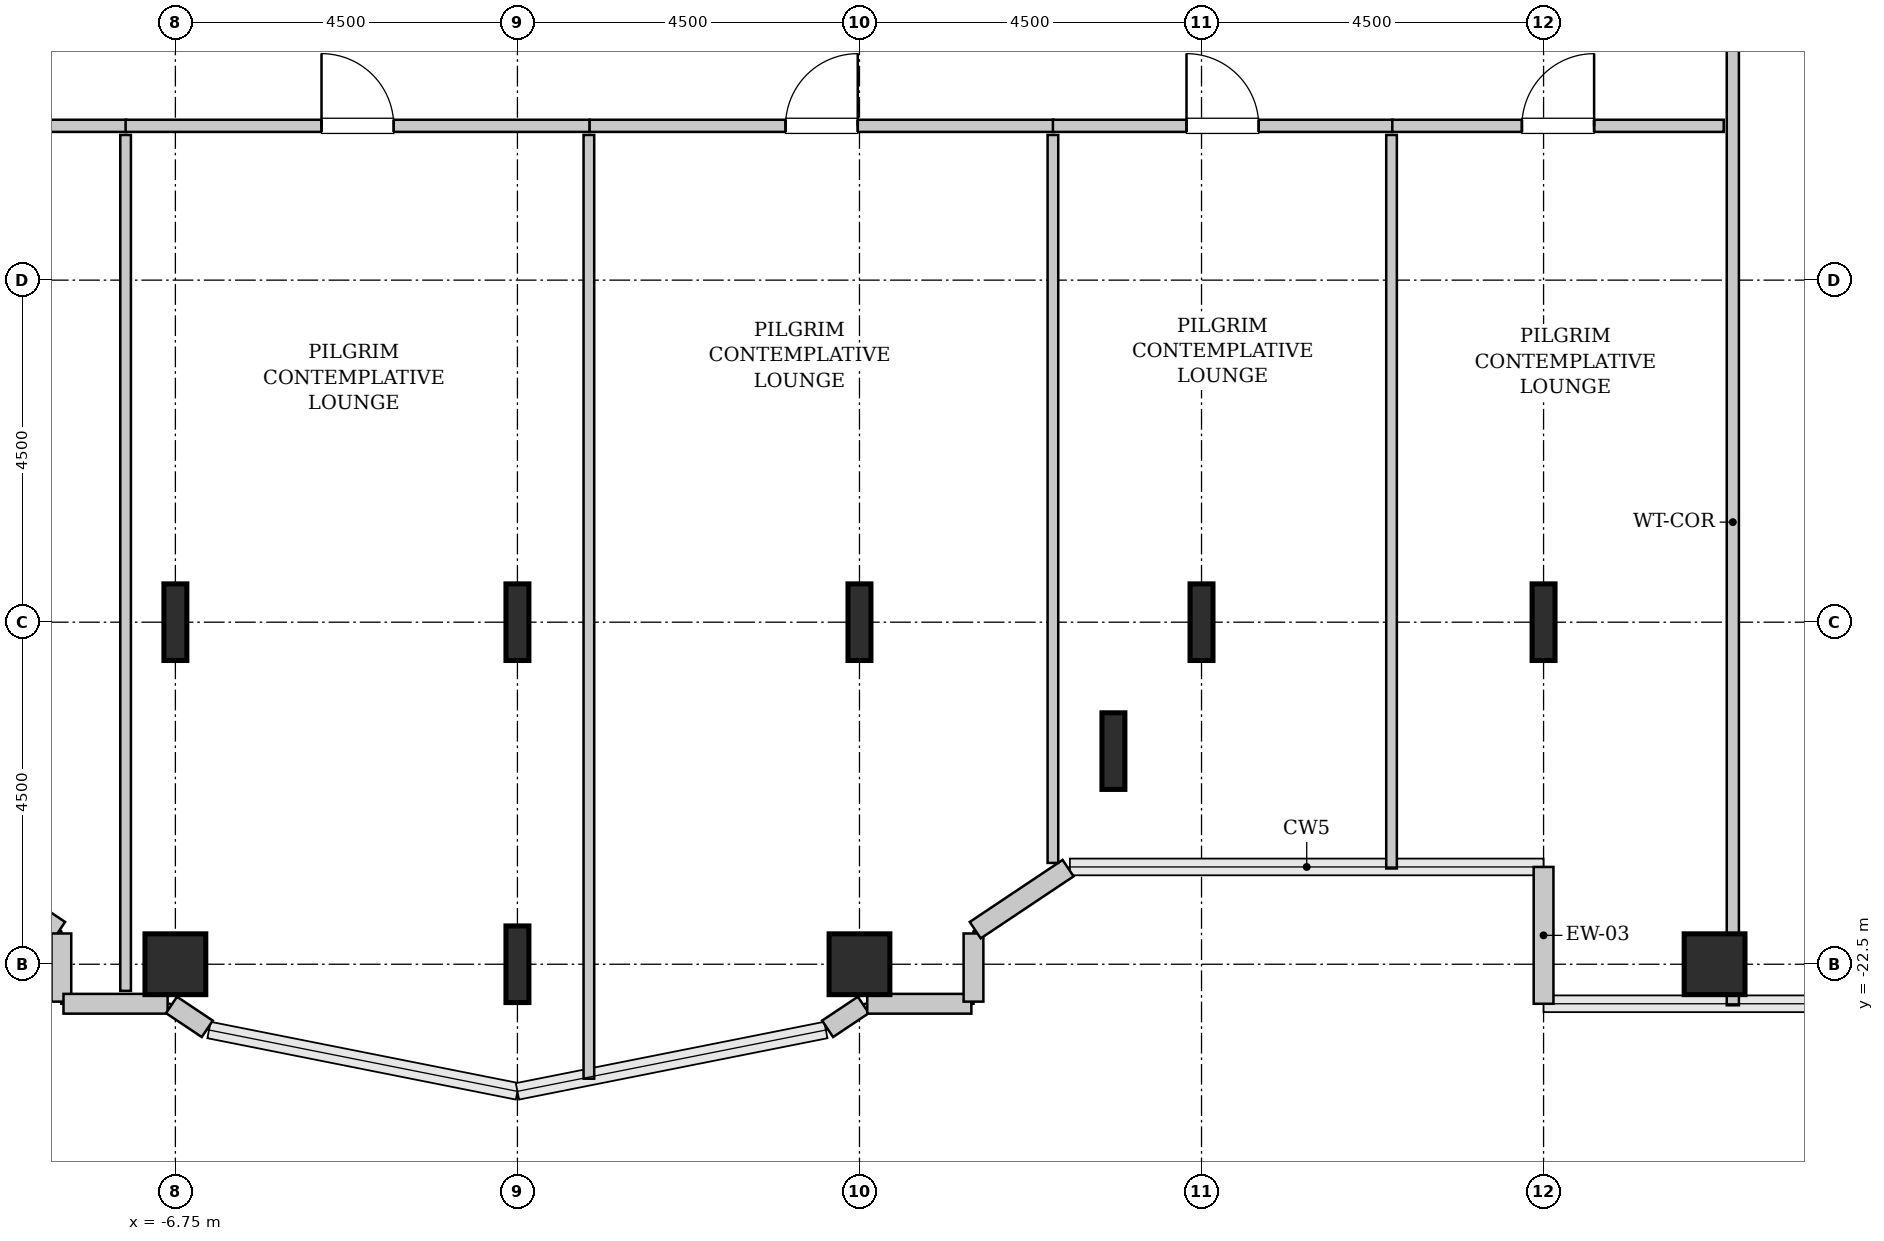
"""IFC4 building model, lengths in metres.
Left out: names, types, materials, properties, quantities, classifications, styles, units other than length and angle.
Written with IfcOpenShell. Run it as: python <this file> out.ifc"""

import sys

from ifc_helpers import new_model, si_unit, direction, frame, frame_2d, origin, origin_2d, place, context, subcontext, project, spatial, rectangle, hollow_rectangle, i_section, extrude, source, transform, mapped, element, fill, save


model = new_model("IFC4")
c1 = context("Model", 3, precision=1e-05, world=origin(), true_north=direction((0.0, 1.0)))
c2 = subcontext(c1, "Body", "Model", "MODEL_VIEW")
j1 = project(units=[si_unit("LENGTHUNIT", "METRE"), si_unit("PLANEANGLEUNIT", "RADIAN")], contexts=[c1])
p1 = place(None, origin())
s1 = spatial("IfcSite", under=j1, at=p1, CompositionType="ELEMENT")
p2 = place(p1, origin())
s2 = spatial("IfcBuilding", under=s1, at=p2, CompositionType="ELEMENT")
p3 = place(p2, frame((0.0, 0.0, 132.6)))
s3 = spatial("IfcBuildingStorey", under=s2, at=p3, CompositionType="ELEMENT", Elevation=132.6)
m1 = source(origin(), c2, "Body", "SweptSolid", [
    extrude(hollow_rectangle(XDim=0.8, YDim=0.8, WallThickness=0.04, InnerFilletRadius=0.04, OuterFilletRadius=0.08, at=origin_2d()), origin(), (0.0, 0.0, 1.0), 3.8),
])
p4 = place(p3, frame((-6.75, -22.5, 0.0), z_axis=(0.0, 0.0, 1.0), x_axis=(1.0, 0.0, 0.0)))
e1 = element("IfcColumn", 1, at=p4, inside=s3, PredefinedType="COLUMN", context=c2, shape_type="MappedRepresentation", body=[
    mapped(m1, transform((0.0, 0.0, 0.0), x_axis=(1.0, 0.0, 0.0), y_axis=(0.0, 1.0, 0.0), z_axis=(0.0, 0.0, 1.0), scale=1.0)),
])
m2 = source(origin(), c2, "Body", "SweptSolid", [
    extrude(i_section(OverallWidth=0.302, OverallDepth=1.008, WebThickness=0.021, FlangeThickness=0.04, FilletRadius=0.03, at=origin_2d()), origin(), (0.0, 0.0, 1.0), 3.8),
])
for number, where, z_axis, x_axis in (
    (2, (-6.75, -18.0, 0.0), (0.0, 0.0, 1.0), (1.0, 0.0, 0.0)),
    (3, (-2.25, -22.5, 0.0), (0.0, 0.0, 1.0), (1.0, 0.0, 0.0)),
    (4, (-2.25, -18.0, 0.0), (0.0, 0.0, 1.0), (1.0, 0.0, 0.0)),
):
    element("IfcColumn", number, at=place(p3, frame(where, z_axis=z_axis, x_axis=x_axis)), inside=s3, PredefinedType="COLUMN", context=c2, shape_type="MappedRepresentation", body=[
        mapped(m2, transform((0.0, 0.0, 0.0), x_axis=(1.0, 0.0, 0.0), y_axis=(0.0, 1.0, 0.0), z_axis=(0.0, 0.0, 1.0), scale=1.0)),
    ])
p5 = place(p3, frame((2.25, -22.5, 0.0), z_axis=(0.0, 0.0, 1.0), x_axis=(1.0, 0.0, 0.0)))
e5 = element("IfcColumn", 5, at=p5, inside=s3, PredefinedType="COLUMN", context=c2, shape_type="MappedRepresentation", body=[
    mapped(m1, transform((0.0, 0.0, 0.0), x_axis=(1.0, 0.0, 0.0), y_axis=(0.0, 1.0, 0.0), z_axis=(0.0, 0.0, 1.0), scale=1.0)),
])
for number, where, z_axis, x_axis in (
    (6, (2.25, -18.0, 0.0), (0.0, 0.0, 1.0), (1.0, 0.0, 0.0)),
    (7, (5.591, -19.696, 0.0), (0.0, 0.0, 1.0), (1.0, 0.0, 0.0)),
    (8, (6.75, -18.0, 0.0), (0.0, 0.0, 1.0), (1.0, 0.0, 0.0)),
    (9, (11.25, -18.0, 0.0), (0.0, 0.0, 1.0), (1.0, 0.0, 0.0)),
):
    element("IfcColumn", number, at=place(p3, frame(where, z_axis=z_axis, x_axis=x_axis)), inside=s3, PredefinedType="COLUMN", context=c2, shape_type="MappedRepresentation", body=[
        mapped(m2, transform((0.0, 0.0, 0.0), x_axis=(1.0, 0.0, 0.0), y_axis=(0.0, 1.0, 0.0), z_axis=(0.0, 0.0, 1.0), scale=1.0)),
    ])
p6 = place(p3, frame((13.5, -22.5, 0.0), z_axis=(0.0, 0.0, 1.0), x_axis=(1.0, 0.0, 0.0)))
e10 = element("IfcColumn", 10, at=p6, inside=s3, PredefinedType="COLUMN", context=c2, shape_type="MappedRepresentation", body=[
    mapped(m1, transform((0.0, 0.0, 0.0), x_axis=(1.0, 0.0, 0.0), y_axis=(0.0, 1.0, 0.0), z_axis=(0.0, 0.0, 1.0), scale=1.0)),
])
m3 = source(origin(), c2, "Body", "SweptSolid", [
    extrude(rectangle(XDim=1.8, YDim=0.26, at=frame_2d((0.9, 0.0))), origin(), (0.0, 0.0, 1.0), 3.55),
])
p7 = place(p3, frame((11.25, -21.22, 0.0), z_axis=(0.0, 0.0, 1.0), x_axis=(0.0, -1.0, 0.0)))
e11 = element("IfcWall", 11, at=p7, inside=s3, PredefinedType="SOLIDWALL", context=c2, shape_type="MappedRepresentation", body=[
    mapped(m3, transform((0.0, 0.0, 0.0), x_axis=(1.0, 0.0, 0.0), y_axis=(0.0, 1.0, 0.0), z_axis=(0.0, 0.0, 1.0), scale=1.0)),
])
m4 = source(origin(), c2, "Body", "SweptSolid", [
    extrude(rectangle(XDim=1.469, YDim=0.26, at=frame_2d((0.734, 0.0))), origin(), (0.0, 0.0, 1.0), 3.55),
])
p8 = place(p3, frame((-9.495, -21.236, 0.0), z_axis=(0.0, 0.0, 1.0), x_axis=(0.831461760506, -0.555581983884, 0.0)))
e12 = element("IfcWall", 12, at=p8, inside=s3, PredefinedType="SOLIDWALL", context=c2, shape_type="MappedRepresentation", body=[
    mapped(m4, transform((0.0, 0.0, 0.0), x_axis=(1.0, 0.0, 0.0), y_axis=(0.0, 1.0, 0.0), z_axis=(0.0, 0.0, 1.0), scale=1.0)),
])
m5 = source(origin(), c2, "Body", "SweptSolid", [
    extrude(rectangle(XDim=0.897, YDim=0.26, at=frame_2d((0.448, 0.0))), origin(), (0.0, 0.0, 1.0), 3.55),
])
p9 = place(p3, frame((-8.25, -22.095, 0.0), z_axis=(0.0, 0.0, 1.0), x_axis=(0.0, -1.0, 0.0)))
e13 = element("IfcWall", 13, at=p9, inside=s3, PredefinedType="SOLIDWALL", context=c2, shape_type="MappedRepresentation", body=[
    mapped(m5, transform((0.0, 0.0, 0.0), x_axis=(1.0, 0.0, 0.0), y_axis=(0.0, 1.0, 0.0), z_axis=(0.0, 0.0, 1.0), scale=1.0)),
])
m6 = source(origin(), c2, "Body", "SweptSolid", [
    extrude(rectangle(XDim=1.37, YDim=0.26, at=frame_2d((0.685, 0.0))), origin(), (0.0, 0.0, 1.0), 3.55),
])
p10 = place(p3, frame((-8.222, -23.02, 0.0), z_axis=(0.0, 0.0, 1.0), x_axis=(1.0, 0.0, 0.0)))
e14 = element("IfcWall", 14, at=p10, inside=s3, PredefinedType="SOLIDWALL", context=c2, shape_type="MappedRepresentation", body=[
    mapped(m6, transform((0.0, 0.0, 0.0), x_axis=(1.0, 0.0, 0.0), y_axis=(0.0, 1.0, 0.0), z_axis=(0.0, 0.0, 1.0), scale=1.0)),
])
m7 = source(origin(), c2, "Body", "SweptSolid", [
    extrude(rectangle(XDim=0.565, YDim=0.26, at=frame_2d((0.283, 0.0))), origin(), (0.0, 0.0, 1.0), 3.55),
])
for number, where, z_axis, x_axis in (
    (15, (-6.801, -23.036, 0.0), (0.0, 0.0, 1.0), (0.832, -0.555, 0.0)),
    (16, (1.831, -23.35, 0.0), (0.0, 0.0, 1.0), (0.832, 0.555, 0.0)),
):
    element("IfcWall", number, at=place(p3, frame(where, z_axis=z_axis, x_axis=x_axis)), inside=s3, PredefinedType="SOLIDWALL", context=c2, shape_type="MappedRepresentation", body=[
        mapped(m7, transform((0.0, 0.0, 0.0), x_axis=(1.0, 0.0, 0.0), y_axis=(0.0, 1.0, 0.0), z_axis=(0.0, 0.0, 1.0), scale=1.0)),
    ])
p11 = place(p3, frame((2.352, -23.02, 0.0), z_axis=(0.0, 0.0, 1.0), x_axis=(1.0, 0.0, 0.0)))
e17 = element("IfcWall", 17, at=p11, inside=s3, PredefinedType="SOLIDWALL", context=c2, shape_type="MappedRepresentation", body=[
    mapped(m6, transform((0.0, 0.0, 0.0), x_axis=(1.0, 0.0, 0.0), y_axis=(0.0, 1.0, 0.0), z_axis=(0.0, 0.0, 1.0), scale=1.0)),
])
p12 = place(p3, frame((3.75, -22.992, 0.0), z_axis=(0.0, 0.0, 1.0), x_axis=(0.0, 1.0, 0.0)))
e18 = element("IfcWall", 18, at=p12, inside=s3, PredefinedType="SOLIDWALL", context=c2, shape_type="MappedRepresentation", body=[
    mapped(m5, transform((0.0, 0.0, 0.0), x_axis=(1.0, 0.0, 0.0), y_axis=(0.0, 1.0, 0.0), z_axis=(0.0, 0.0, 1.0), scale=1.0)),
])
p13 = place(p3, frame((3.773, -22.052, 0.0), z_axis=(0.0, 0.0, 1.0), x_axis=(0.831461760506, 0.555581983884, 0.0)))
e19 = element("IfcWall", 19, at=p13, inside=s3, PredefinedType="SOLIDWALL", context=c2, shape_type="MappedRepresentation", body=[
    mapped(m4, transform((0.0, 0.0, 0.0), x_axis=(1.0, 0.0, 0.0), y_axis=(0.0, 1.0, 0.0), z_axis=(0.0, 0.0, 1.0), scale=1.0)),
])
m8 = source(origin(), c2, "Body", "SweptSolid", [
    extrude(rectangle(XDim=14.745, YDim=0.16, at=frame_2d((7.373, 0.0))), origin(), (0.0, 0.0, 1.0), 3.535),
])
p14 = place(p3, frame((13.74, -23.04, 0.0), z_axis=(0.0, 0.0, 1.0), x_axis=(0.0, 1.0, 0.0)))
e20 = element("IfcWall", 20, at=p14, inside=s3, PredefinedType="PARTITIONING", context=c2, shape_type="MappedRepresentation", body=[
    mapped(m8, transform((0.0, 0.0, 0.0), x_axis=(1.0, 0.0, 0.0), y_axis=(0.0, 1.0, 0.0), z_axis=(0.0, 0.0, 1.0), scale=1.0)),
])
p15 = place(p14, frame((12.663, 0.0, 0.0)))
e21 = element("IfcOpeningElement", 21, at=p15, cuts=e20, PredefinedType="OPENING", context=c2, shape_type="SweptSolid", body=[
    extrude(rectangle(XDim=0.95, YDim=2.1, at=frame_2d((0.475, 1.05))), frame((0.0, 0.09, 0.0), z_axis=(0.0, -1.0, 0.0), x_axis=(1.0, 0.0, 0.0)), (0.0, 0.0, 1.0), 0.18),
])
m9 = source(origin(), c2, "Body", "SweptSolid", [
    extrude(rectangle(XDim=6.225, YDim=0.16, at=frame_2d((3.113, 0.0))), origin(), (0.0, 0.0, 1.0), 3.535),
])
p16 = place(p3, frame((-13.62, -11.47, 0.0), z_axis=(0.0, 0.0, 1.0), x_axis=(1.0, 0.0, 0.0)))
e22 = element("IfcWall", 22, at=p16, inside=s3, PredefinedType="PARTITIONING", context=c2, shape_type="MappedRepresentation", body=[
    mapped(m9, transform((0.0, 0.0, 0.0), x_axis=(1.0, 0.0, 0.0), y_axis=(0.0, 1.0, 0.0), z_axis=(0.0, 0.0, 1.0), scale=1.0)),
])
p17 = place(p16, frame((2.637, 0.0, 0.0)))
e23 = element("IfcOpeningElement", 23, at=p17, cuts=e22, PredefinedType="OPENING", context=c2, shape_type="SweptSolid", body=[
    extrude(rectangle(XDim=0.95, YDim=2.1, at=frame_2d((0.475, 1.05))), frame((0.0, 0.09, 0.0), z_axis=(0.0, -1.0, 0.0), x_axis=(1.0, 0.0, 0.0)), (0.0, 0.0, 1.0), 0.18),
])
m10 = source(origin(), c2, "Body", "SweptSolid", [
    extrude(rectangle(XDim=11.26, YDim=0.14, at=frame_2d((5.63, 0.0))), origin(), (0.0, 0.0, 1.0), 3.535),
])
p18 = place(p3, frame((-7.405, -22.85, 0.0), z_axis=(0.0, 0.0, 1.0), x_axis=(0.0, 1.0, 0.0)))
e24 = element("IfcWall", 24, at=p18, inside=s3, PredefinedType="PARTITIONING", context=c2, shape_type="MappedRepresentation", body=[
    mapped(m10, transform((0.0, 0.0, 0.0), x_axis=(1.0, 0.0, 0.0), y_axis=(0.0, 1.0, 0.0), z_axis=(0.0, 0.0, 1.0), scale=1.0)),
])
m11 = source(origin(), c2, "Body", "SweptSolid", [
    extrude(rectangle(XDim=6.105, YDim=0.16, at=frame_2d((3.052, 0.0))), origin(), (0.0, 0.0, 1.0), 3.535),
])
p19 = place(p3, frame((-7.405, -11.47, 0.0), z_axis=(0.0, 0.0, 1.0), x_axis=(1.0, 0.0, 0.0)))
e25 = element("IfcWall", 25, at=p19, inside=s3, PredefinedType="PARTITIONING", context=c2, shape_type="MappedRepresentation", body=[
    mapped(m11, transform((0.0, 0.0, 0.0), x_axis=(1.0, 0.0, 0.0), y_axis=(0.0, 1.0, 0.0), z_axis=(0.0, 0.0, 1.0), scale=1.0)),
])
p20 = place(p19, frame((2.577, 0.0, 0.0)))
e26 = element("IfcOpeningElement", 26, at=p20, cuts=e25, PredefinedType="OPENING", context=c2, shape_type="SweptSolid", body=[
    extrude(rectangle(XDim=0.95, YDim=2.1, at=frame_2d((0.475, 1.05))), frame((0.0, 0.09, 0.0), z_axis=(0.0, -1.0, 0.0), x_axis=(1.0, 0.0, 0.0)), (0.0, 0.0, 1.0), 0.18),
])
m12 = source(origin(), c2, "Body", "SweptSolid", [
    extrude(rectangle(XDim=12.416, YDim=0.14, at=frame_2d((6.208, 0.0))), origin(), (0.0, 0.0, 1.0), 3.535),
])
p21 = place(p3, frame((-1.31, -24.006, 0.0), z_axis=(0.0, 0.0, 1.0), x_axis=(0.0, 1.0, 0.0)))
e27 = element("IfcWall", 27, at=p21, inside=s3, PredefinedType="PARTITIONING", context=c2, shape_type="MappedRepresentation", body=[
    mapped(m12, transform((0.0, 0.0, 0.0), x_axis=(1.0, 0.0, 0.0), y_axis=(0.0, 1.0, 0.0), z_axis=(0.0, 0.0, 1.0), scale=1.0)),
])
p22 = place(p3, frame((-1.3, -11.47, 0.0), z_axis=(0.0, 0.0, 1.0), x_axis=(1.0, 0.0, 0.0)))
e28 = element("IfcWall", 28, at=p22, inside=s3, PredefinedType="PARTITIONING", context=c2, shape_type="MappedRepresentation", body=[
    mapped(m11, transform((0.0, 0.0, 0.0), x_axis=(1.0, 0.0, 0.0), y_axis=(0.0, 1.0, 0.0), z_axis=(0.0, 0.0, 1.0), scale=1.0)),
])
p23 = place(p22, frame((2.577, 0.0, 0.0)))
e29 = element("IfcOpeningElement", 29, at=p23, cuts=e28, PredefinedType="OPENING", context=c2, shape_type="SweptSolid", body=[
    extrude(rectangle(XDim=0.95, YDim=2.1, at=frame_2d((0.475, 1.05))), frame((0.0, 0.09, 0.0), z_axis=(0.0, -1.0, 0.0), x_axis=(1.0, 0.0, 0.0)), (0.0, 0.0, 1.0), 0.18),
])
m13 = source(origin(), c2, "Body", "SweptSolid", [
    extrude(rectangle(XDim=9.577, YDim=0.14, at=frame_2d((4.789, 0.0))), origin(), (0.0, 0.0, 1.0), 3.535),
])
p24 = place(p3, frame((4.795, -21.167, 0.0), z_axis=(0.0, 0.0, 1.0), x_axis=(0.0, 1.0, 0.0)))
e30 = element("IfcWall", 30, at=p24, inside=s3, PredefinedType="PARTITIONING", context=c2, shape_type="MappedRepresentation", body=[
    mapped(m13, transform((0.0, 0.0, 0.0), x_axis=(1.0, 0.0, 0.0), y_axis=(0.0, 1.0, 0.0), z_axis=(0.0, 0.0, 1.0), scale=1.0)),
])
m14 = source(origin(), c2, "Body", "SweptSolid", [
    extrude(rectangle(XDim=4.465, YDim=0.16, at=frame_2d((2.232, 0.0))), origin(), (0.0, 0.0, 1.0), 3.535),
])
p25 = place(p3, frame((4.795, -11.47, 0.0), z_axis=(0.0, 0.0, 1.0), x_axis=(1.0, 0.0, 0.0)))
e31 = element("IfcWall", 31, at=p25, inside=s3, PredefinedType="PARTITIONING", context=c2, shape_type="MappedRepresentation", body=[
    mapped(m14, transform((0.0, 0.0, 0.0), x_axis=(1.0, 0.0, 0.0), y_axis=(0.0, 1.0, 0.0), z_axis=(0.0, 0.0, 1.0), scale=1.0)),
])
p26 = place(p25, frame((1.758, 0.0, 0.0)))
e32 = element("IfcOpeningElement", 32, at=p26, cuts=e31, PredefinedType="OPENING", context=c2, shape_type="SweptSolid", body=[
    extrude(rectangle(XDim=0.95, YDim=2.1, at=frame_2d((0.475, 1.05))), frame((0.0, 0.09, 0.0), z_axis=(0.0, -1.0, 0.0), x_axis=(1.0, 0.0, 0.0)), (0.0, 0.0, 1.0), 0.18),
])
m15 = source(origin(), c2, "Body", "SweptSolid", [
    extrude(rectangle(XDim=9.65, YDim=0.14, at=frame_2d((4.825, 0.0))), origin(), (0.0, 0.0, 1.0), 3.535),
])
p27 = place(p3, frame((9.25, -21.24, 0.0), z_axis=(0.0, 0.0, 1.0), x_axis=(0.0, 1.0, 0.0)))
e33 = element("IfcWall", 33, at=p27, inside=s3, PredefinedType="PARTITIONING", context=c2, shape_type="MappedRepresentation", body=[
    mapped(m15, transform((0.0, 0.0, 0.0), x_axis=(1.0, 0.0, 0.0), y_axis=(0.0, 1.0, 0.0), z_axis=(0.0, 0.0, 1.0), scale=1.0)),
])
m16 = source(origin(), c2, "Body", "SweptSolid", [
    extrude(rectangle(XDim=4.36, YDim=0.16, at=frame_2d((2.18, 0.0))), origin(), (0.0, 0.0, 1.0), 3.535),
])
p28 = place(p3, frame((9.26, -11.47, 0.0), z_axis=(0.0, 0.0, 1.0), x_axis=(1.0, 0.0, 0.0)))
e34 = element("IfcWall", 34, at=p28, inside=s3, PredefinedType="PARTITIONING", context=c2, shape_type="MappedRepresentation", body=[
    mapped(m16, transform((0.0, 0.0, 0.0), x_axis=(1.0, 0.0, 0.0), y_axis=(0.0, 1.0, 0.0), z_axis=(0.0, 0.0, 1.0), scale=1.0)),
])
p29 = place(p28, frame((1.705, 0.0, 0.0)))
e35 = element("IfcOpeningElement", 35, at=p29, cuts=e34, PredefinedType="OPENING", context=c2, shape_type="SweptSolid", body=[
    extrude(rectangle(XDim=0.95, YDim=2.1, at=frame_2d((0.475, 1.05))), frame((0.0, 0.09, 0.0), z_axis=(0.0, -1.0, 0.0), x_axis=(1.0, 0.0, 0.0)), (0.0, 0.0, 1.0), 0.18),
])
m17 = source(origin(), c2, "Body", "SweptSolid", [
    extrude(rectangle(XDim=0.95, YDim=2.1, at=frame_2d((0.475, 1.05))), frame((0.0, 0.025, 0.0), z_axis=(0.0, -1.0, 0.0), x_axis=(1.0, 0.0, 0.0)), (0.0, 0.0, 1.0), 0.05),
])
p30 = place(p20, origin())
e36 = element("IfcDoor", 36, at=p30, inside=s3, OperationType="SINGLE_SWING_LEFT", PredefinedType="DOOR", context=c2, shape_type="MappedRepresentation", body=[
    mapped(m17, transform((0.0, 0.0, 0.0), x_axis=(1.0, 0.0, 0.0), y_axis=(0.0, 1.0, 0.0), z_axis=(0.0, 0.0, 1.0), scale=1.0)),
])
fill(e26, e36)
p31 = place(p23, origin())
e37 = element("IfcDoor", 37, at=p31, inside=s3, OperationType="SINGLE_SWING_RIGHT", PredefinedType="DOOR", context=c2, shape_type="MappedRepresentation", body=[
    mapped(m17, transform((0.0, 0.0, 0.0), x_axis=(1.0, 0.0, 0.0), y_axis=(0.0, 1.0, 0.0), z_axis=(0.0, 0.0, 1.0), scale=1.0)),
])
fill(e29, e37)
p32 = place(p26, origin())
e38 = element("IfcDoor", 38, at=p32, inside=s3, OperationType="SINGLE_SWING_LEFT", PredefinedType="DOOR", context=c2, shape_type="MappedRepresentation", body=[
    mapped(m17, transform((0.0, 0.0, 0.0), x_axis=(1.0, 0.0, 0.0), y_axis=(0.0, 1.0, 0.0), z_axis=(0.0, 0.0, 1.0), scale=1.0)),
])
fill(e32, e38)
p33 = place(p29, origin())
e39 = element("IfcDoor", 39, at=p33, inside=s3, OperationType="SINGLE_SWING_RIGHT", PredefinedType="DOOR", context=c2, shape_type="MappedRepresentation", body=[
    mapped(m17, transform((0.0, 0.0, 0.0), x_axis=(1.0, 0.0, 0.0), y_axis=(0.0, 1.0, 0.0), z_axis=(0.0, 0.0, 1.0), scale=1.0)),
])
fill(e35, e39)
save(model, sys.argv[1])
